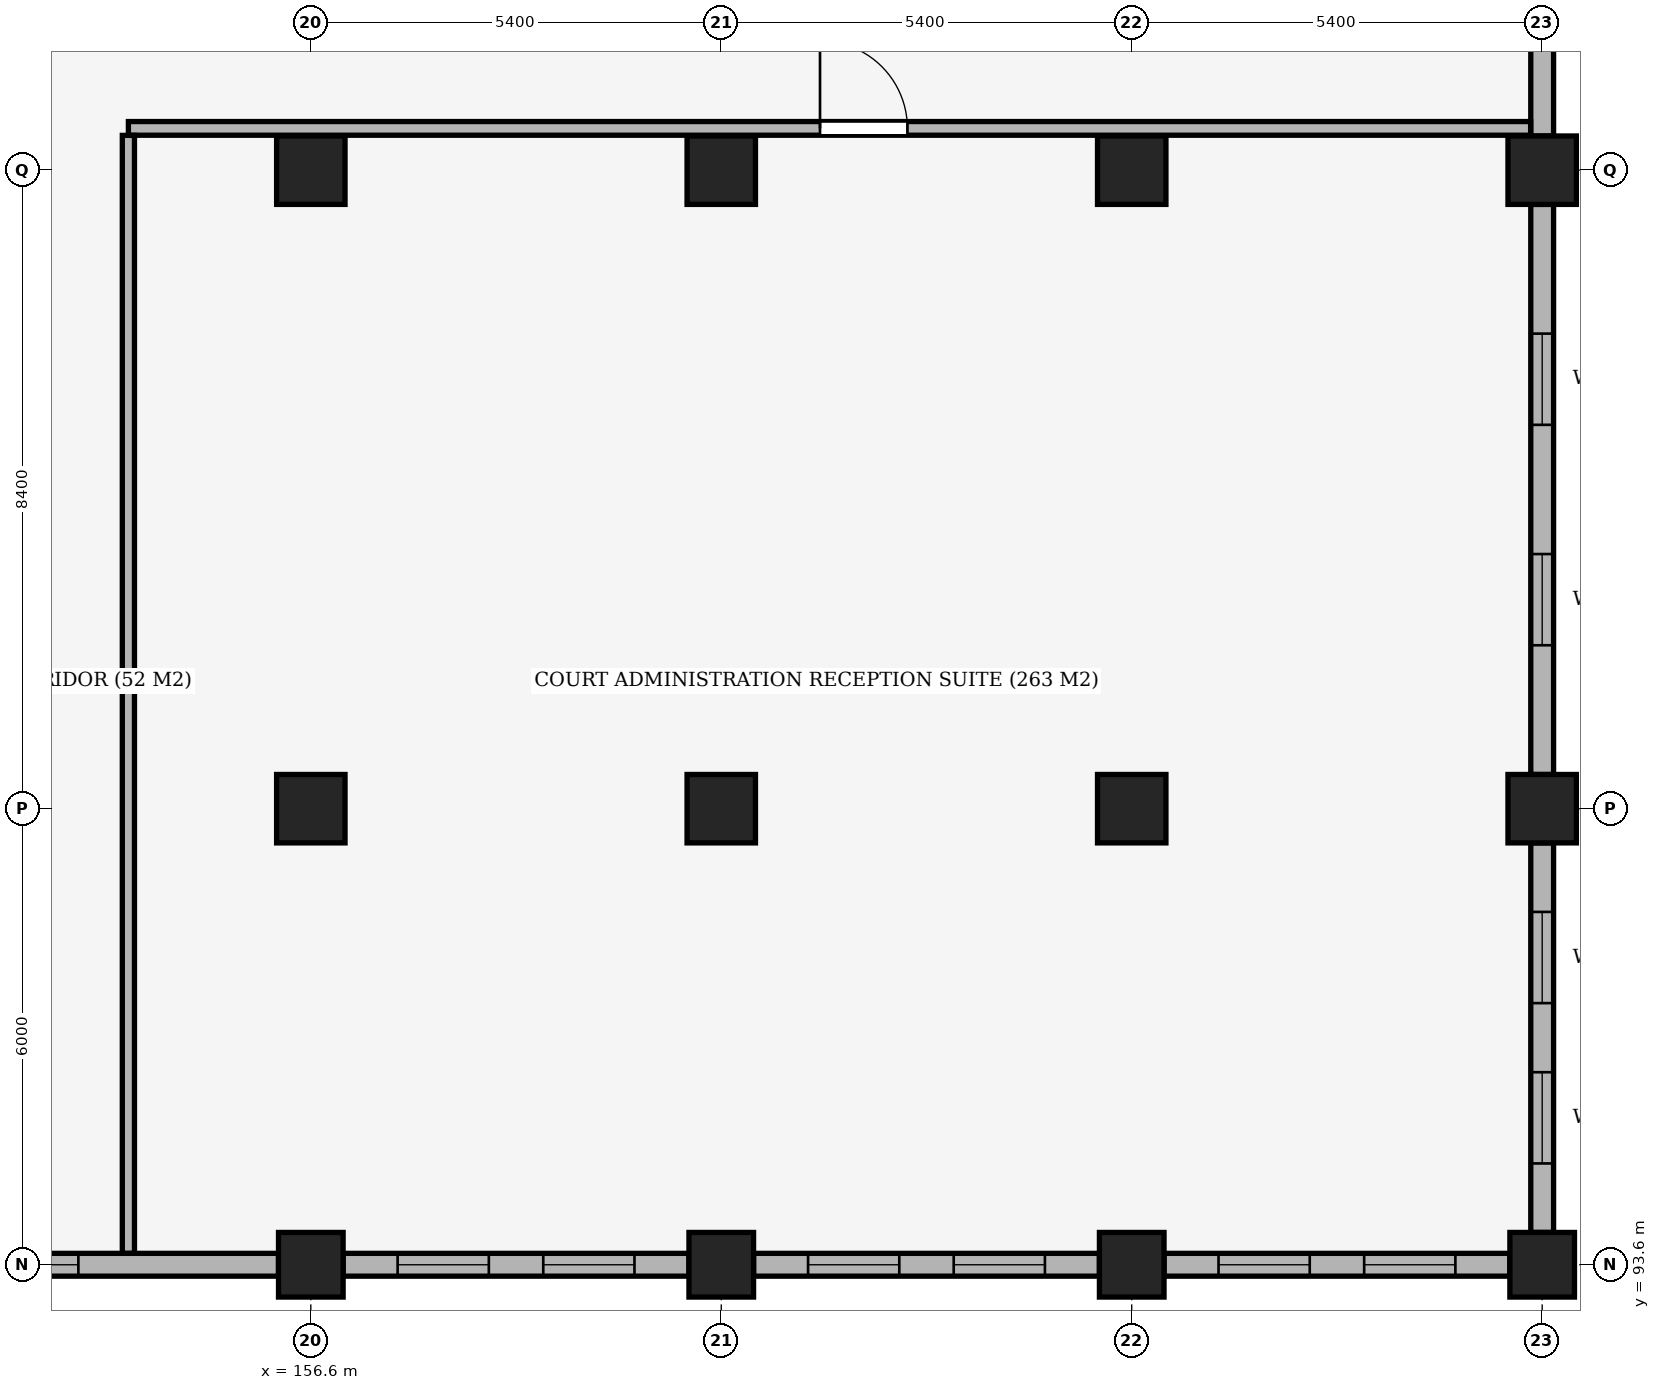
"""IFC4 building model, lengths in metres.
Left out: names, types, materials, properties, quantities, classifications, styles, units other than length and angle.
Written with IfcOpenShell. Run it as: python <this file> out.ifc"""

import sys

from ifc_helpers import new_model, si_unit, direction, frame, frame_2d, origin, origin_2d, place, context, subcontext, project, spatial, rectangle, extrude, element, fill, save


model = new_model("IFC4")
c1 = context("Model", 3, precision=1e-05, world=origin(), true_north=direction((0.0, 1.0)))
c2 = subcontext(c1, "Body", "Model", "MODEL_VIEW")
j1 = project(units=[si_unit("LENGTHUNIT", "METRE"), si_unit("PLANEANGLEUNIT", "RADIAN")], contexts=[c1])
p1 = place(None, origin())
s1 = spatial("IfcSite", under=j1, at=p1, CompositionType="ELEMENT")
p2 = place(p1, origin())
s2 = spatial("IfcBuilding", under=s1, at=p2, CompositionType="ELEMENT")
p3 = place(p2, origin())
s3 = spatial("IfcBuildingStorey", under=s2, at=p3, CompositionType="ELEMENT", Elevation=0.0)
p4 = place(p3, frame((156.6, 93.6, 0.0), z_axis=(0.0, 0.0, 1.0), x_axis=(1.0, 0.0, 0.0)))
e1 = element("IfcColumn", 1, at=p4, inside=s3, PredefinedType="COLUMN", context=c2, shape_type="SweptSolid", body=[
    extrude(rectangle(XDim=0.85, YDim=0.85, at=origin_2d()), origin(), (0.0, 0.0, 1.0), 5.1),
])
for number, where, z_axis, x_axis in (
    (2, (156.6, 99.6, 0.0), (0.0, 0.0, 1.0), (1.0, 0.0, 0.0)),
    (3, (156.6, 108.0, 0.0), (0.0, 0.0, 1.0), (1.0, 0.0, 0.0)),
):
    element("IfcColumn", number, at=place(p3, frame(where, z_axis=z_axis, x_axis=x_axis)), inside=s3, PredefinedType="COLUMN", context=c2, shape_type="SweptSolid", body=[
        extrude(rectangle(XDim=0.9, YDim=0.9, at=origin_2d()), origin(), (0.0, 0.0, 1.0), 5.1),
    ])
p5 = place(p3, frame((162.0, 93.6, 0.0), z_axis=(0.0, 0.0, 1.0), x_axis=(1.0, 0.0, 0.0)))
e4 = element("IfcColumn", 4, at=p5, inside=s3, PredefinedType="COLUMN", context=c2, shape_type="SweptSolid", body=[
    extrude(rectangle(XDim=0.85, YDim=0.85, at=origin_2d()), origin(), (0.0, 0.0, 1.0), 5.1),
])
for number, where, z_axis, x_axis in (
    (5, (162.0, 99.6, 0.0), (0.0, 0.0, 1.0), (1.0, 0.0, 0.0)),
    (6, (162.0, 108.0, 0.0), (0.0, 0.0, 1.0), (1.0, 0.0, 0.0)),
):
    element("IfcColumn", number, at=place(p3, frame(where, z_axis=z_axis, x_axis=x_axis)), inside=s3, PredefinedType="COLUMN", context=c2, shape_type="SweptSolid", body=[
        extrude(rectangle(XDim=0.9, YDim=0.9, at=origin_2d()), origin(), (0.0, 0.0, 1.0), 5.1),
    ])
p6 = place(p3, frame((167.4, 93.6, 0.0), z_axis=(0.0, 0.0, 1.0), x_axis=(1.0, 0.0, 0.0)))
e7 = element("IfcColumn", 7, at=p6, inside=s3, PredefinedType="COLUMN", context=c2, shape_type="SweptSolid", body=[
    extrude(rectangle(XDim=0.85, YDim=0.85, at=origin_2d()), origin(), (0.0, 0.0, 1.0), 5.1),
])
for number, where, z_axis, x_axis in (
    (8, (167.4, 99.6, 0.0), (0.0, 0.0, 1.0), (1.0, 0.0, 0.0)),
    (9, (167.4, 108.0, 0.0), (0.0, 0.0, 1.0), (1.0, 0.0, 0.0)),
):
    element("IfcColumn", number, at=place(p3, frame(where, z_axis=z_axis, x_axis=x_axis)), inside=s3, PredefinedType="COLUMN", context=c2, shape_type="SweptSolid", body=[
        extrude(rectangle(XDim=0.9, YDim=0.9, at=origin_2d()), origin(), (0.0, 0.0, 1.0), 5.1),
    ])
p7 = place(p3, frame((172.8, 93.6, 0.0), z_axis=(0.0, 0.0, 1.0), x_axis=(1.0, 0.0, 0.0)))
e10 = element("IfcColumn", 10, at=p7, inside=s3, PredefinedType="COLUMN", context=c2, shape_type="SweptSolid", body=[
    extrude(rectangle(XDim=0.85, YDim=0.85, at=origin_2d()), origin(), (0.0, 0.0, 1.0), 5.1),
])
for number, where, z_axis, x_axis in (
    (11, (172.8, 99.6, 0.0), (0.0, 0.0, 1.0), (1.0, 0.0, 0.0)),
    (12, (172.8, 108.0, 0.0), (0.0, 0.0, 1.0), (1.0, 0.0, 0.0)),
):
    element("IfcColumn", number, at=place(p3, frame(where, z_axis=z_axis, x_axis=x_axis)), inside=s3, PredefinedType="COLUMN", context=c2, shape_type="SweptSolid", body=[
        extrude(rectangle(XDim=0.9, YDim=0.9, at=origin_2d()), origin(), (0.0, 0.0, 1.0), 5.1),
    ])
p8 = place(p3, frame((172.8, 112.95, 0.0), z_axis=(0.0, 0.0, 1.0), x_axis=(0.0, -1.0, 0.0)))
e13 = element("IfcWall", 13, at=p8, inside=s3, PredefinedType="SOLIDWALL", context=c2, shape_type="SweptSolid", body=[
    extrude(rectangle(XDim=4.5, YDim=0.3, at=frame_2d((2.25, 0.0))), origin(), (0.0, 0.0, 1.0), 4.17),
])
p9 = place(p8, frame((1.55, 0.0, 0.0)))
e14 = element("IfcOpeningElement", 14, at=p9, cuts=e13, PredefinedType="OPENING", context=c2, shape_type="SweptSolid", body=[
    extrude(rectangle(XDim=1.8, YDim=2.2, at=frame_2d((0.9, 1.1))), frame((0.0, 0.165, 0.0), z_axis=(0.0, -1.0, 0.0), x_axis=(1.0, 0.0, 0.0)), (0.0, 0.0, 1.0), 0.33),
])
p10 = place(p3, frame((172.8, 107.55, 0.0), z_axis=(0.0, 0.0, 1.0), x_axis=(0.0, -1.0, 0.0)))
e15 = element("IfcWall", 15, at=p10, inside=s3, PredefinedType="SOLIDWALL", context=c2, shape_type="SweptSolid", body=[
    extrude(rectangle(XDim=7.5, YDim=0.3, at=frame_2d((3.75, 0.0))), origin(), (0.0, 0.0, 1.0), 4.02),
])
p11 = place(p10, frame((1.7, 0.0, 0.85)))
e16 = element("IfcOpeningElement", 16, at=p11, cuts=e15, PredefinedType="OPENING", context=c2, shape_type="SweptSolid", body=[
    extrude(rectangle(XDim=1.2, YDim=2.4, at=frame_2d((0.6, 1.2))), frame((0.0, 0.165, 0.0), z_axis=(0.0, -1.0, 0.0), x_axis=(1.0, 0.0, 0.0)), (0.0, 0.0, 1.0), 0.33),
])
p12 = place(p10, frame((4.6, 0.0, 0.85)))
e17 = element("IfcOpeningElement", 17, at=p12, cuts=e15, PredefinedType="OPENING", context=c2, shape_type="SweptSolid", body=[
    extrude(rectangle(XDim=1.2, YDim=2.4, at=frame_2d((0.6, 1.2))), frame((0.0, 0.165, 0.0), z_axis=(0.0, -1.0, 0.0), x_axis=(1.0, 0.0, 0.0)), (0.0, 0.0, 1.0), 0.33),
])
p13 = place(p3, frame((172.8, 99.15, 0.0), z_axis=(0.0, 0.0, 1.0), x_axis=(0.0, -1.0, 0.0)))
e18 = element("IfcWall", 18, at=p13, inside=s3, PredefinedType="SOLIDWALL", context=c2, shape_type="SweptSolid", body=[
    extrude(rectangle(XDim=5.125, YDim=0.3, at=frame_2d((2.562, 0.0))), origin(), (0.0, 0.0, 1.0), 4.17),
])
p14 = place(p13, frame((0.908, 0.0, 0.85)))
e19 = element("IfcOpeningElement", 19, at=p14, cuts=e18, PredefinedType="OPENING", context=c2, shape_type="SweptSolid", body=[
    extrude(rectangle(XDim=1.2, YDim=2.4, at=frame_2d((0.6, 1.2))), frame((0.0, 0.165, 0.0), z_axis=(0.0, -1.0, 0.0), x_axis=(1.0, 0.0, 0.0)), (0.0, 0.0, 1.0), 0.33),
])
p15 = place(p13, frame((3.017, 0.0, 0.85)))
e20 = element("IfcOpeningElement", 20, at=p15, cuts=e18, PredefinedType="OPENING", context=c2, shape_type="SweptSolid", body=[
    extrude(rectangle(XDim=1.2, YDim=2.4, at=frame_2d((0.6, 1.2))), frame((0.0, 0.165, 0.0), z_axis=(0.0, -1.0, 0.0), x_axis=(1.0, 0.0, 0.0)), (0.0, 0.0, 1.0), 0.33),
])
p16 = place(p3, frame((172.375, 93.6, 0.0), z_axis=(0.0, 0.0, 1.0), x_axis=(-1.0, 0.0, 0.0)))
e21 = element("IfcWall", 21, at=p16, inside=s3, PredefinedType="SOLIDWALL", context=c2, shape_type="SweptSolid", body=[
    extrude(rectangle(XDim=4.55, YDim=0.3, at=frame_2d((2.275, 0.0))), origin(), (0.0, 0.0, 1.0), 4.22),
])
p17 = place(p16, frame((0.717, 0.0, 0.85)))
e22 = element("IfcOpeningElement", 22, at=p17, cuts=e21, PredefinedType="OPENING", context=c2, shape_type="SweptSolid", body=[
    extrude(rectangle(XDim=1.2, YDim=2.4, at=frame_2d((0.6, 1.2))), frame((0.0, 0.165, 0.0), z_axis=(0.0, -1.0, 0.0), x_axis=(1.0, 0.0, 0.0)), (0.0, 0.0, 1.0), 0.33),
])
p18 = place(p16, frame((2.633, 0.0, 0.85)))
e23 = element("IfcOpeningElement", 23, at=p18, cuts=e21, PredefinedType="OPENING", context=c2, shape_type="SweptSolid", body=[
    extrude(rectangle(XDim=1.2, YDim=2.4, at=frame_2d((0.6, 1.2))), frame((0.0, 0.165, 0.0), z_axis=(0.0, -1.0, 0.0), x_axis=(1.0, 0.0, 0.0)), (0.0, 0.0, 1.0), 0.33),
])
p19 = place(p3, frame((166.975, 93.6, 0.0), z_axis=(0.0, 0.0, 1.0), x_axis=(-1.0, 0.0, 0.0)))
e24 = element("IfcWall", 24, at=p19, inside=s3, PredefinedType="SOLIDWALL", context=c2, shape_type="SweptSolid", body=[
    extrude(rectangle(XDim=4.55, YDim=0.3, at=frame_2d((2.275, 0.0))), origin(), (0.0, 0.0, 1.0), 4.22),
])
p20 = place(p19, frame((0.717, 0.0, 0.85)))
e25 = element("IfcOpeningElement", 25, at=p20, cuts=e24, PredefinedType="OPENING", context=c2, shape_type="SweptSolid", body=[
    extrude(rectangle(XDim=1.2, YDim=2.4, at=frame_2d((0.6, 1.2))), frame((0.0, 0.165, 0.0), z_axis=(0.0, -1.0, 0.0), x_axis=(1.0, 0.0, 0.0)), (0.0, 0.0, 1.0), 0.33),
])
p21 = place(p19, frame((2.633, 0.0, 0.85)))
e26 = element("IfcOpeningElement", 26, at=p21, cuts=e24, PredefinedType="OPENING", context=c2, shape_type="SweptSolid", body=[
    extrude(rectangle(XDim=1.2, YDim=2.4, at=frame_2d((0.6, 1.2))), frame((0.0, 0.165, 0.0), z_axis=(0.0, -1.0, 0.0), x_axis=(1.0, 0.0, 0.0)), (0.0, 0.0, 1.0), 0.33),
])
p22 = place(p3, frame((161.575, 93.6, 0.0), z_axis=(0.0, 0.0, 1.0), x_axis=(-1.0, 0.0, 0.0)))
e27 = element("IfcWall", 27, at=p22, inside=s3, PredefinedType="SOLIDWALL", context=c2, shape_type="SweptSolid", body=[
    extrude(rectangle(XDim=4.55, YDim=0.3, at=frame_2d((2.275, 0.0))), origin(), (0.0, 0.0, 1.0), 4.22),
])
p23 = place(p22, frame((0.717, 0.0, 0.85)))
e28 = element("IfcOpeningElement", 28, at=p23, cuts=e27, PredefinedType="OPENING", context=c2, shape_type="SweptSolid", body=[
    extrude(rectangle(XDim=1.2, YDim=2.4, at=frame_2d((0.6, 1.2))), frame((0.0, 0.165, 0.0), z_axis=(0.0, -1.0, 0.0), x_axis=(1.0, 0.0, 0.0)), (0.0, 0.0, 1.0), 0.33),
])
p24 = place(p22, frame((2.633, 0.0, 0.85)))
e29 = element("IfcOpeningElement", 29, at=p24, cuts=e27, PredefinedType="OPENING", context=c2, shape_type="SweptSolid", body=[
    extrude(rectangle(XDim=1.2, YDim=2.4, at=frame_2d((0.6, 1.2))), frame((0.0, 0.165, 0.0), z_axis=(0.0, -1.0, 0.0), x_axis=(1.0, 0.0, 0.0)), (0.0, 0.0, 1.0), 0.33),
])
p25 = place(p3, frame((156.175, 93.6, 0.0), z_axis=(0.0, 0.0, 1.0), x_axis=(-1.0, 0.0, 0.0)))
e30 = element("IfcWall", 30, at=p25, inside=s3, PredefinedType="SOLIDWALL", context=c2, shape_type="SweptSolid", body=[
    extrude(rectangle(XDim=4.55, YDim=0.3, at=frame_2d((2.275, 0.0))), origin(), (0.0, 0.0, 1.0), 4.22),
])
p26 = place(p25, frame((2.633, 0.0, 0.85)))
e31 = element("IfcOpeningElement", 31, at=p26, cuts=e30, PredefinedType="OPENING", context=c2, shape_type="SweptSolid", body=[
    extrude(rectangle(XDim=1.2, YDim=2.4, at=frame_2d((0.6, 1.2))), frame((0.0, 0.165, 0.0), z_axis=(0.0, -1.0, 0.0), x_axis=(1.0, 0.0, 0.0)), (0.0, 0.0, 1.0), 0.33),
])
p27 = place(p3, frame((154.2, 108.55, 0.0), z_axis=(0.0, 0.0, 1.0), x_axis=(1.0, 0.0, 0.0)))
e32 = element("IfcWall", 32, at=p27, inside=s3, PredefinedType="PARTITIONING", context=c2, shape_type="SweptSolid", body=[
    extrude(rectangle(XDim=18.448, YDim=0.18, at=frame_2d((9.224, 0.0))), origin(), (0.0, 0.0, 1.0), 4.17),
])
p28 = place(p27, frame((9.099, 0.0, 0.0)))
e33 = element("IfcOpeningElement", 33, at=p28, cuts=e32, PredefinedType="OPENING", context=c2, shape_type="SweptSolid", body=[
    extrude(rectangle(XDim=1.15, YDim=2.15, at=frame_2d((0.575, 1.075))), frame((0.0, 0.105, 0.0), z_axis=(0.0, -1.0, 0.0), x_axis=(1.0, 0.0, 0.0)), (0.0, 0.0, 1.0), 0.21),
])
p29 = place(p3, frame((154.2, 93.752, 0.0), z_axis=(0.0, 0.0, 1.0), x_axis=(0.0, 1.0, 0.0)))
e34 = element("IfcWall", 34, at=p29, inside=s3, PredefinedType="PARTITIONING", context=c2, shape_type="SweptSolid", body=[
    extrude(rectangle(XDim=14.706, YDim=0.16, at=frame_2d((7.353, 0.0))), origin(), (0.0, 0.0, 1.0), 4.22),
])
p30 = place(p11, origin())
e35 = element("IfcWindow", 35, at=p30, inside=s3, PartitioningType="SINGLE_PANEL", PredefinedType="WINDOW", context=c2, shape_type="SweptSolid", body=[
    extrude(rectangle(XDim=1.2, YDim=2.4, at=frame_2d((0.6, 1.2))), frame((0.0, 0.03, 0.0), z_axis=(0.0, -1.0, 0.0), x_axis=(1.0, 0.0, 0.0)), (0.0, 0.0, 1.0), 0.06),
])
fill(e16, e35)
p31 = place(p12, origin())
e36 = element("IfcWindow", 36, at=p31, inside=s3, PartitioningType="SINGLE_PANEL", PredefinedType="WINDOW", context=c2, shape_type="SweptSolid", body=[
    extrude(rectangle(XDim=1.2, YDim=2.4, at=frame_2d((0.6, 1.2))), frame((0.0, 0.03, 0.0), z_axis=(0.0, -1.0, 0.0), x_axis=(1.0, 0.0, 0.0)), (0.0, 0.0, 1.0), 0.06),
])
fill(e17, e36)
p32 = place(p14, origin())
e37 = element("IfcWindow", 37, at=p32, inside=s3, PartitioningType="SINGLE_PANEL", PredefinedType="WINDOW", context=c2, shape_type="SweptSolid", body=[
    extrude(rectangle(XDim=1.2, YDim=2.4, at=frame_2d((0.6, 1.2))), frame((0.0, 0.03, 0.0), z_axis=(0.0, -1.0, 0.0), x_axis=(1.0, 0.0, 0.0)), (0.0, 0.0, 1.0), 0.06),
])
fill(e19, e37)
p33 = place(p15, origin())
e38 = element("IfcWindow", 38, at=p33, inside=s3, PartitioningType="SINGLE_PANEL", PredefinedType="WINDOW", context=c2, shape_type="SweptSolid", body=[
    extrude(rectangle(XDim=1.2, YDim=2.4, at=frame_2d((0.6, 1.2))), frame((0.0, 0.03, 0.0), z_axis=(0.0, -1.0, 0.0), x_axis=(1.0, 0.0, 0.0)), (0.0, 0.0, 1.0), 0.06),
])
fill(e20, e38)
p34 = place(p17, origin())
e39 = element("IfcWindow", 39, at=p34, inside=s3, PartitioningType="SINGLE_PANEL", PredefinedType="WINDOW", context=c2, shape_type="SweptSolid", body=[
    extrude(rectangle(XDim=1.2, YDim=2.4, at=frame_2d((0.6, 1.2))), frame((0.0, 0.03, 0.0), z_axis=(0.0, -1.0, 0.0), x_axis=(1.0, 0.0, 0.0)), (0.0, 0.0, 1.0), 0.06),
])
fill(e22, e39)
p35 = place(p18, origin())
e40 = element("IfcWindow", 40, at=p35, inside=s3, PartitioningType="SINGLE_PANEL", PredefinedType="WINDOW", context=c2, shape_type="SweptSolid", body=[
    extrude(rectangle(XDim=1.2, YDim=2.4, at=frame_2d((0.6, 1.2))), frame((0.0, 0.03, 0.0), z_axis=(0.0, -1.0, 0.0), x_axis=(1.0, 0.0, 0.0)), (0.0, 0.0, 1.0), 0.06),
])
fill(e23, e40)
p36 = place(p20, origin())
e41 = element("IfcWindow", 41, at=p36, inside=s3, PartitioningType="SINGLE_PANEL", PredefinedType="WINDOW", context=c2, shape_type="SweptSolid", body=[
    extrude(rectangle(XDim=1.2, YDim=2.4, at=frame_2d((0.6, 1.2))), frame((0.0, 0.03, 0.0), z_axis=(0.0, -1.0, 0.0), x_axis=(1.0, 0.0, 0.0)), (0.0, 0.0, 1.0), 0.06),
])
fill(e25, e41)
p37 = place(p21, origin())
e42 = element("IfcWindow", 42, at=p37, inside=s3, PartitioningType="SINGLE_PANEL", PredefinedType="WINDOW", context=c2, shape_type="SweptSolid", body=[
    extrude(rectangle(XDim=1.2, YDim=2.4, at=frame_2d((0.6, 1.2))), frame((0.0, 0.03, 0.0), z_axis=(0.0, -1.0, 0.0), x_axis=(1.0, 0.0, 0.0)), (0.0, 0.0, 1.0), 0.06),
])
fill(e26, e42)
p38 = place(p23, origin())
e43 = element("IfcWindow", 43, at=p38, inside=s3, PartitioningType="SINGLE_PANEL", PredefinedType="WINDOW", context=c2, shape_type="SweptSolid", body=[
    extrude(rectangle(XDim=1.2, YDim=2.4, at=frame_2d((0.6, 1.2))), frame((0.0, 0.03, 0.0), z_axis=(0.0, -1.0, 0.0), x_axis=(1.0, 0.0, 0.0)), (0.0, 0.0, 1.0), 0.06),
])
fill(e28, e43)
p39 = place(p24, origin())
e44 = element("IfcWindow", 44, at=p39, inside=s3, PartitioningType="SINGLE_PANEL", PredefinedType="WINDOW", context=c2, shape_type="SweptSolid", body=[
    extrude(rectangle(XDim=1.2, YDim=2.4, at=frame_2d((0.6, 1.2))), frame((0.0, 0.03, 0.0), z_axis=(0.0, -1.0, 0.0), x_axis=(1.0, 0.0, 0.0)), (0.0, 0.0, 1.0), 0.06),
])
fill(e29, e44)
p40 = place(p26, origin())
e45 = element("IfcWindow", 45, at=p40, inside=s3, PartitioningType="SINGLE_PANEL", PredefinedType="WINDOW", context=c2, shape_type="SweptSolid", body=[
    extrude(rectangle(XDim=1.2, YDim=2.4, at=frame_2d((0.6, 1.2))), frame((0.0, 0.03, 0.0), z_axis=(0.0, -1.0, 0.0), x_axis=(1.0, 0.0, 0.0)), (0.0, 0.0, 1.0), 0.06),
])
fill(e31, e45)
p41 = place(p28, origin())
e46 = element("IfcDoor", 46, at=p41, inside=s3, OperationType="SINGLE_SWING_LEFT", PredefinedType="DOOR", context=c2, shape_type="SweptSolid", body=[
    extrude(rectangle(XDim=1.15, YDim=2.15, at=frame_2d((0.575, 1.075))), frame((0.0, 0.025, 0.0), z_axis=(0.0, -1.0, 0.0), x_axis=(1.0, 0.0, 0.0)), (0.0, 0.0, 1.0), 0.05),
])
fill(e33, e46)
save(model, sys.argv[1])
